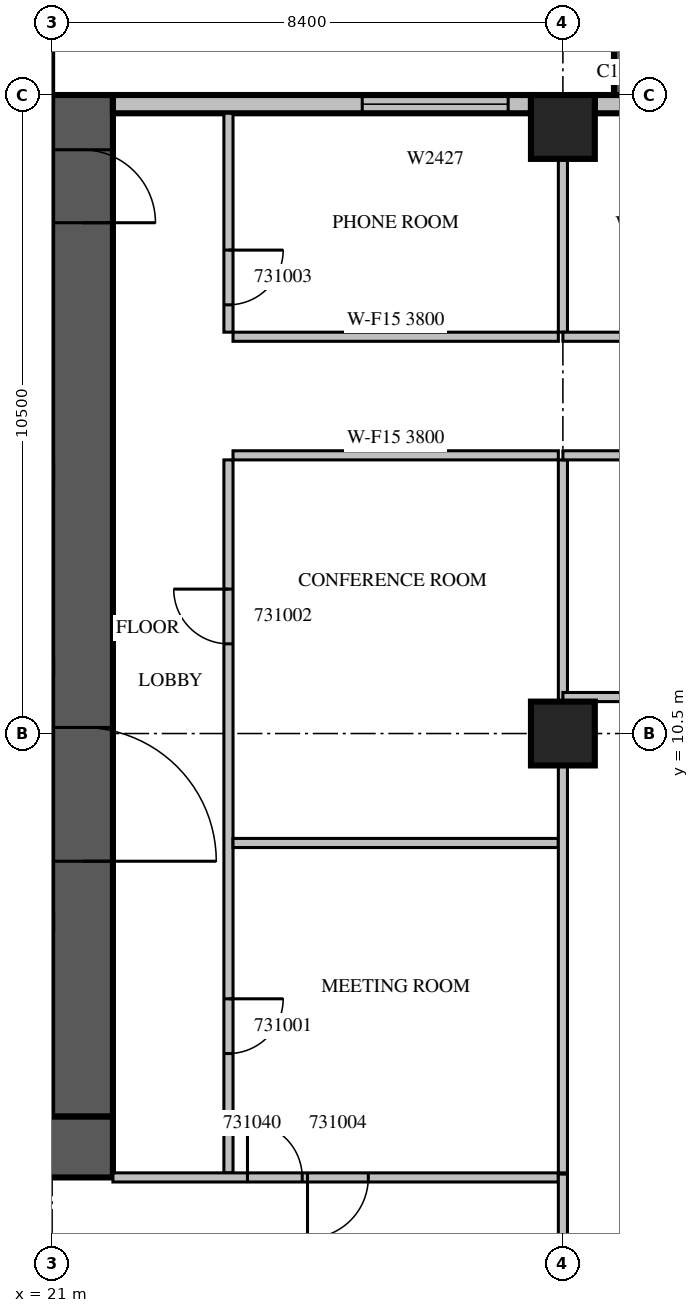
"""IFC4 building model, lengths in metres.
Left out: names, types, materials, properties, quantities, classifications, styles, units other than length and angle.
Written with IfcOpenShell. Run it as: python <this file> out.ifc"""

import sys

from ifc_helpers import new_model, si_unit, direction, frame, frame_2d, origin, origin_2d, place, context, subcontext, project, spatial, rectangle, extrude, source, transform, mapped, element, fill, save


model = new_model("IFC4")
c1 = context("Model", 3, precision=1e-05, world=origin(), true_north=direction((0.0, 1.0)))
c2 = subcontext(c1, "Body", "Model", "MODEL_VIEW")
j1 = project(units=[si_unit("LENGTHUNIT", "METRE"), si_unit("PLANEANGLEUNIT", "RADIAN")], contexts=[c1])
p1 = place(None, origin())
s1 = spatial("IfcSite", under=j1, at=p1, CompositionType="ELEMENT")
p2 = place(p1, origin())
s2 = spatial("IfcBuilding", under=s1, at=p2, CompositionType="ELEMENT")
p3 = place(p2, frame((0.0, 0.0, 141.3)))
s3 = spatial("IfcBuildingStorey", under=s2, at=p3, CompositionType="ELEMENT", Elevation=141.3)
m1 = source(origin(), c2, "Body", "SweptSolid", [
    extrude(rectangle(XDim=1.05, YDim=1.05, at=origin_2d()), origin(), (0.0, 0.0, 1.0), 4.2),
])
for number, where, z_axis, x_axis in (
    (1, (29.4, 10.5, 0.0), (0.0, 0.0, 1.0), (1.0, 0.0, 0.0)),
    (2, (29.4, 20.475, 0.0), (0.0, 0.0, 1.0), (1.0, 0.0, 0.0)),
):
    element("IfcColumn", number, at=place(p3, frame(where, z_axis=z_axis, x_axis=x_axis)), inside=s3, PredefinedType="COLUMN", context=c2, shape_type="MappedRepresentation", body=[
        mapped(m1, transform((0.0, 0.0, 0.0), scale=1.0)),
    ])
m2 = source(origin(), c2, "Body", "SweptSolid", [
    extrude(rectangle(XDim=16.8, YDim=1.0, at=frame_2d((8.4, 0.0))), origin(), (0.0, 0.0, 1.0), 4.2),
])
p4 = place(p3, frame((21.5, 4.2, 0.0), z_axis=(0.0, 0.0, 1.0), x_axis=(0.0, 1.0, 0.0)))
e3 = element("IfcWall", 3, at=p4, inside=s3, PredefinedType="SHEAR", context=c2, shape_type="MappedRepresentation", body=[
    mapped(m2, transform((0.0, 0.0, 0.0), scale=1.0)),
])
m3 = source(origin(), c2, "Body", "SweptSolid", [
    extrude(rectangle(XDim=2.2, YDim=2.1, at=frame_2d((1.1, 1.05))), frame((0.0, 0.51, 0.0), z_axis=(0.0, -1.0, 0.0), x_axis=(1.0, 0.0, 0.0)), (0.0, 0.0, 1.0), 1.02),
])
p5 = place(p4, frame((4.2, 0.0, 0.0)))
e4 = element("IfcOpeningElement", 4, at=p5, cuts=e3, PredefinedType="OPENING", context=c2, shape_type="MappedRepresentation", body=[
    mapped(m3, transform((0.0, 0.0, 0.0), scale=1.0)),
])
m4 = source(origin(), c2, "Body", "SweptSolid", [
    extrude(rectangle(XDim=1.2, YDim=2.1, at=frame_2d((0.6, 1.05))), frame((0.0, 0.51, 0.0), z_axis=(0.0, -1.0, 0.0), x_axis=(1.0, 0.0, 0.0)), (0.0, 0.0, 1.0), 1.02),
])
p6 = place(p4, frame((14.7, 0.0, 0.0)))
e5 = element("IfcOpeningElement", 5, at=p6, cuts=e3, PredefinedType="OPENING", context=c2, shape_type="MappedRepresentation", body=[
    mapped(m4, transform((0.0, 0.0, 0.0), scale=1.0)),
])
m5 = source(origin(), c2, "Body", "SweptSolid", [
    extrude(rectangle(XDim=17.8, YDim=1.0, at=frame_2d((8.9, 0.0))), origin(), (0.0, 0.0, 1.0), 4.2),
])
p7 = place(p3, frame((4.2, 3.7, 0.0), z_axis=(0.0, 0.0, 1.0), x_axis=(1.0, 0.0, 0.0)))
e6 = element("IfcWall", 6, at=p7, inside=s3, PredefinedType="SHEAR", context=c2, shape_type="MappedRepresentation", body=[
    mapped(m5, transform((0.0, 0.0, 0.0), scale=1.0)),
])
m6 = source(origin(), c2, "Body", "SweptSolid", [
    extrude(rectangle(XDim=3.9, YDim=0.2, at=frame_2d((1.95, 0.0))), origin(), (0.0, 0.0, 1.0), 3.8),
])
p8 = place(p3, frame((30.34, 21.0, 0.0), z_axis=(0.0, 0.0, 1.0), x_axis=(0.0, 1.0, 0.0)))
e7 = element("IfcWall", 7, at=p8, inside=s3, PredefinedType="SOLIDWALL", context=c2, shape_type="MappedRepresentation", body=[
    mapped(m6, transform((0.0, 0.0, 0.0), scale=1.0)),
])
m7 = source(origin(), c2, "Body", "SweptSolid", [
    extrude(rectangle(XDim=2.4, YDim=2.7, at=frame_2d((1.2, 1.35))), frame((0.0, 0.11, 0.0), z_axis=(0.0, -1.0, 0.0), x_axis=(1.0, 0.0, 0.0)), (0.0, 0.0, 1.0), 0.22),
])
p9 = place(p8, frame((0.75, 0.0, 0.6)))
e8 = element("IfcOpeningElement", 8, at=p9, cuts=e7, PredefinedType="OPENING", context=c2, shape_type="MappedRepresentation", body=[
    mapped(m7, transform((0.0, 0.0, 0.0), scale=1.0)),
])
m8 = source(origin(), c2, "Body", "SweptSolid", [
    extrude(rectangle(XDim=7.35, YDim=0.3, at=frame_2d((3.675, 0.0))), origin(), (0.0, 0.0, 1.0), 3.8),
])
p10 = place(p3, frame((37.275, 20.85, 0.0), z_axis=(0.0, 0.0, 1.0), x_axis=(-1.0, 0.0, 0.0)))
e9 = element("IfcWall", 9, at=p10, inside=s3, PredefinedType="STANDARD", context=c2, shape_type="MappedRepresentation", body=[
    mapped(m8, transform((0.0, 0.0, 0.0), scale=1.0)),
])
m9 = source(origin(), c2, "Body", "SweptSolid", [
    extrude(rectangle(XDim=1.0, YDim=2.1, at=frame_2d((0.5, 1.05))), frame((0.0, 0.16, 0.0), z_axis=(0.0, -1.0, 0.0), x_axis=(1.0, 0.0, 0.0)), (0.0, 0.0, 1.0), 0.32),
])
p11 = place(p10, frame((5.135, 0.0, 0.0)))
e10 = element("IfcOpeningElement", 10, at=p11, cuts=e9, PredefinedType="OPENING", context=c2, shape_type="MappedRepresentation", body=[
    mapped(m9, transform((0.0, 0.0, 0.0), scale=1.0)),
])
m10 = source(origin(), c2, "Body", "SweptSolid", [
    extrude(rectangle(XDim=6.875, YDim=0.3, at=frame_2d((3.438, 0.0))), origin(), (0.0, 0.0, 1.0), 3.8),
])
p12 = place(p3, frame((28.875, 20.85, 0.0), z_axis=(0.0, 0.0, 1.0), x_axis=(-1.0, 0.0, 0.0)))
e11 = element("IfcWall", 11, at=p12, inside=s3, PredefinedType="STANDARD", context=c2, shape_type="MappedRepresentation", body=[
    mapped(m10, transform((0.0, 0.0, 0.0), scale=1.0)),
])
m11 = source(origin(), c2, "Body", "SweptSolid", [
    extrude(rectangle(XDim=2.4, YDim=2.7, at=frame_2d((1.2, 1.35))), frame((0.0, 0.16, 0.0), z_axis=(0.0, -1.0, 0.0), x_axis=(1.0, 0.0, 0.0)), (0.0, 0.0, 1.0), 0.32),
])
p13 = place(p12, frame((0.375, 0.0, 0.6)))
e12 = element("IfcOpeningElement", 12, at=p13, cuts=e11, PredefinedType="OPENING", context=c2, shape_type="MappedRepresentation", body=[
    mapped(m11, transform((0.0, 0.0, 0.0), scale=1.0)),
])
m12 = source(origin(), c2, "Body", "SweptSolid", [
    extrude(rectangle(XDim=11.725, YDim=0.15, at=frame_2d((5.862, 0.0))), origin(), (0.0, 0.0, 1.0), 3.8),
])
p14 = place(p3, frame((23.9, 15.0, 0.0), z_axis=(0.0, 0.0, 1.0), x_axis=(0.0, -1.0, 0.0)))
e13 = element("IfcWall", 13, at=p14, inside=s3, PredefinedType="PARTITIONING", context=c2, shape_type="MappedRepresentation", body=[
    mapped(m12, transform((0.0, 0.0, 0.0), scale=1.0)),
])
m13 = source(origin(), c2, "Body", "SweptSolid", [
    extrude(rectangle(XDim=0.9, YDim=2.1, at=frame_2d((0.45, 1.05))), frame((0.0, 0.085, 0.0), z_axis=(0.0, -1.0, 0.0), x_axis=(1.0, 0.0, 0.0)), (0.0, 0.0, 1.0), 0.17),
])
p15 = place(p14, frame((8.863, 0.0, 0.0)))
e14 = element("IfcOpeningElement", 14, at=p15, cuts=e13, PredefinedType="OPENING", context=c2, shape_type="MappedRepresentation", body=[
    mapped(m13, transform((0.0, 0.0, 0.0), scale=1.0)),
])
p16 = place(p14, frame((2.125, 0.0, 0.0)))
e15 = element("IfcOpeningElement", 15, at=p16, cuts=e13, PredefinedType="OPENING", context=c2, shape_type="MappedRepresentation", body=[
    mapped(m13, transform((0.0, 0.0, 0.0), scale=1.0)),
])
m14 = source(origin(), c2, "Body", "SweptSolid", [
    extrude(rectangle(XDim=3.6, YDim=0.15, at=frame_2d((1.8, 0.0))), origin(), (0.0, 0.0, 1.0), 3.8),
])
p17 = place(p3, frame((23.9, 20.7, 0.0), z_axis=(0.0, 0.0, 1.0), x_axis=(0.0, -1.0, 0.0)))
e16 = element("IfcWall", 16, at=p17, inside=s3, PredefinedType="PARTITIONING", context=c2, shape_type="MappedRepresentation", body=[
    mapped(m14, transform((0.0, 0.0, 0.0), scale=1.0)),
])
p18 = place(p17, frame((2.25, 0.0, 0.0)))
e17 = element("IfcOpeningElement", 17, at=p18, cuts=e16, PredefinedType="OPENING", context=c2, shape_type="MappedRepresentation", body=[
    mapped(m13, transform((0.0, 0.0, 0.0), scale=1.0)),
])
p19 = place(p3, frame((29.325, 8.7, 0.0), z_axis=(0.0, 0.0, 1.0), x_axis=(-1.0, 0.0, 0.0)))
e18 = element("IfcWall", 18, at=p19, inside=s3, PredefinedType="PARTITIONING", context=c2, shape_type="SweptSolid", body=[
    extrude(rectangle(XDim=5.35, YDim=0.15, at=frame_2d((2.675, 0.0))), origin(), (0.0, 0.0, 1.0), 3.8),
])
m15 = source(origin(), c2, "Body", "SweptSolid", [
    extrude(rectangle(XDim=5.35, YDim=0.15, at=frame_2d((2.675, 0.0))), origin(), (0.0, 0.0, 1.0), 3.8),
])
for number, where, z_axis, x_axis in (
    (19, (29.325, 15.075, 0.0), (0.0, 0.0, 1.0), (-1.0, 0.0, 0.0)),
    (20, (23.975, 17.025, 0.0), (0.0, 0.0, 1.0), (1.0, 0.0, 0.0)),
):
    element("IfcWall", number, at=place(p3, frame(where, z_axis=z_axis, x_axis=x_axis)), inside=s3, PredefinedType="PARTITIONING", context=c2, shape_type="MappedRepresentation", body=[
        mapped(m15, transform((0.0, 0.0, 0.0), scale=1.0)),
    ])
m16 = source(origin(), c2, "Body", "SweptSolid", [
    extrude(rectangle(XDim=6.701, YDim=0.15, at=frame_2d((3.35, 0.0))), origin(), (0.0, 0.0, 1.0), 3.8),
])
p20 = place(p3, frame((29.4, 3.275, 0.0), z_axis=(0.0, 0.0, 1.0), x_axis=(0.0, 1.0, 0.0)))
e21 = element("IfcWall", 21, at=p20, inside=s3, PredefinedType="PARTITIONING", context=c2, shape_type="MappedRepresentation", body=[
    mapped(m16, transform((0.0, 0.0, 0.0), scale=1.0)),
])
m17 = source(origin(), c2, "Body", "SweptSolid", [
    extrude(rectangle(XDim=3.976, YDim=0.15, at=frame_2d((1.988, 0.0))), origin(), (0.0, 0.0, 1.0), 3.8),
])
p21 = place(p3, frame((29.4, 11.024, 0.0), z_axis=(0.0, 0.0, 1.0), x_axis=(0.0, 1.0, 0.0)))
e22 = element("IfcWall", 22, at=p21, inside=s3, PredefinedType="PARTITIONING", context=c2, shape_type="MappedRepresentation", body=[
    mapped(m17, transform((0.0, 0.0, 0.0), scale=1.0)),
])
m18 = source(origin(), c2, "Body", "SweptSolid", [
    extrude(rectangle(XDim=2.851, YDim=0.15, at=frame_2d((1.425, 0.0))), origin(), (0.0, 0.0, 1.0), 3.8),
])
p22 = place(p3, frame((29.4, 17.1, 0.0), z_axis=(0.0, 0.0, 1.0), x_axis=(0.0, 1.0, 0.0)))
e23 = element("IfcWall", 23, at=p22, inside=s3, PredefinedType="PARTITIONING", context=c2, shape_type="MappedRepresentation", body=[
    mapped(m18, transform((0.0, 0.0, 0.0), scale=1.0)),
])
m19 = source(origin(), c2, "Body", "SweptSolid", [
    extrude(rectangle(XDim=7.325, YDim=0.15, at=frame_2d((3.663, 0.0))), origin(), (0.0, 0.0, 1.0), 3.8),
])
p23 = place(p3, frame((22.0, 3.2, 0.0), z_axis=(0.0, 0.0, 1.0), x_axis=(1.0, 0.0, 0.0)))
e24 = element("IfcWall", 24, at=p23, inside=s3, PredefinedType="PARTITIONING", context=c2, shape_type="MappedRepresentation", body=[
    mapped(m19, transform((0.0, 0.0, 0.0), scale=1.0)),
])
m20 = source(origin(), c2, "Body", "SweptSolid", [
    extrude(rectangle(XDim=1.0, YDim=2.1, at=frame_2d((0.5, 1.05))), frame((0.0, 0.085, 0.0), z_axis=(0.0, -1.0, 0.0), x_axis=(1.0, 0.0, 0.0)), (0.0, 0.0, 1.0), 0.17),
])
p24 = place(p23, frame((3.2, 0.0, 0.0)))
e25 = element("IfcOpeningElement", 25, at=p24, cuts=e24, PredefinedType="OPENING", context=c2, shape_type="MappedRepresentation", body=[
    mapped(m20, transform((0.0, 0.0, 0.0), scale=1.0)),
])
p25 = place(p23, frame((2.213, 0.0, 0.0)))
e26 = element("IfcOpeningElement", 26, at=p25, cuts=e24, PredefinedType="OPENING", context=c2, shape_type="MappedRepresentation", body=[
    mapped(m13, transform((0.0, 0.0, 0.0), scale=1.0)),
])
m21 = source(origin(), c2, "Body", "SweptSolid", [
    extrude(rectangle(XDim=2.206, YDim=0.15, at=frame_2d((1.103, 0.0))), origin(), (0.0, 0.0, 1.0), 3.8),
])
p26 = place(p3, frame((29.4, 1.049, 0.0), z_axis=(0.0, 0.0, 1.0), x_axis=(0.0, 1.0, 0.0)))
e27 = element("IfcWall", 27, at=p26, inside=s3, PredefinedType="PARTITIONING", context=c2, shape_type="MappedRepresentation", body=[
    mapped(m21, transform((0.0, 0.0, 0.0), scale=1.0)),
])
m22 = source(origin(), c2, "Body", "SweptSolid", [
    extrude(rectangle(XDim=8.4, YDim=0.15, at=frame_2d((4.2, 0.0))), origin(), (0.0, 0.0, 1.0), 3.8),
])
p27 = place(p3, frame((37.8, 11.1, 0.0), z_axis=(0.0, 0.0, 1.0), x_axis=(-1.0, 0.0, 0.0)))
e28 = element("IfcWall", 28, at=p27, inside=s3, PredefinedType="PARTITIONING", context=c2, shape_type="MappedRepresentation", body=[
    mapped(m22, transform((0.0, 0.0, 0.0), scale=1.0)),
])
p28 = place(p27, frame((5.575, 0.0, 0.0)))
e29 = element("IfcOpeningElement", 29, at=p28, cuts=e28, PredefinedType="OPENING", context=c2, shape_type="MappedRepresentation", body=[
    mapped(m13, transform((0.0, 0.0, 0.0), scale=1.0)),
])
p29 = place(p27, frame((1.875, 0.0, 0.0)))
e30 = element("IfcOpeningElement", 30, at=p29, cuts=e28, PredefinedType="OPENING", context=c2, shape_type="MappedRepresentation", body=[
    mapped(m13, transform((0.0, 0.0, 0.0), scale=1.0)),
])
p30 = place(p3, frame((37.8, 15.075, 0.0), z_axis=(0.0, 0.0, 1.0), x_axis=(-1.0, 0.0, 0.0)))
e31 = element("IfcWall", 31, at=p30, inside=s3, PredefinedType="PARTITIONING", context=c2, shape_type="MappedRepresentation", body=[
    mapped(m22, transform((0.0, 0.0, 0.0), scale=1.0)),
])
m23 = source(origin(), c2, "Body", "SweptSolid", [
    extrude(rectangle(XDim=1.2, YDim=2.1, at=frame_2d((0.6, 1.05))), frame((0.0, 0.085, 0.0), z_axis=(0.0, -1.0, 0.0), x_axis=(1.0, 0.0, 0.0)), (0.0, 0.0, 1.0), 0.17),
])
p31 = place(p30, frame((3.6, 0.0, 0.0)))
e32 = element("IfcOpeningElement", 32, at=p31, cuts=e31, PredefinedType="OPENING", context=c2, shape_type="MappedRepresentation", body=[
    mapped(m23, transform((0.0, 0.0, 0.0), scale=1.0)),
])
m24 = source(origin(), c2, "Body", "SweptSolid", [
    extrude(rectangle(XDim=37.5, YDim=0.15, at=frame_2d((18.75, 0.0))), origin(), (0.0, 0.0, 1.0), 3.8),
])
p32 = place(p3, frame((29.4, 17.025, 0.0), z_axis=(0.0, 0.0, 1.0), x_axis=(1.0, 0.0, 0.0)))
e33 = element("IfcWall", 33, at=p32, inside=s3, PredefinedType="PARTITIONING", context=c2, shape_type="MappedRepresentation", body=[
    mapped(m24, transform((0.0, 0.0, 0.0), scale=1.0)),
])
p33 = place(p32, frame((1.357, 0.0, 0.0)))
e34 = element("IfcOpeningElement", 34, at=p33, cuts=e33, PredefinedType="OPENING", context=c2, shape_type="MappedRepresentation", body=[
    mapped(m20, transform((0.0, 0.0, 0.0), scale=1.0)),
])
p34 = place(p32, frame((4.669, 0.0, 0.0)))
e35 = element("IfcOpeningElement", 35, at=p34, cuts=e33, PredefinedType="OPENING", context=c2, shape_type="MappedRepresentation", body=[
    mapped(m20, transform((0.0, 0.0, 0.0), scale=1.0)),
])
p35 = place(p32, frame((7.012, 0.0, 0.0)))
e36 = element("IfcOpeningElement", 36, at=p35, cuts=e33, PredefinedType="OPENING", context=c2, shape_type="MappedRepresentation", body=[
    mapped(m20, transform((0.0, 0.0, 0.0), scale=1.0)),
])
p36 = place(p32, frame((12.0, 0.0, 0.0)))
e37 = element("IfcOpeningElement", 37, at=p36, cuts=e33, PredefinedType="OPENING", context=c2, shape_type="MappedRepresentation", body=[
    mapped(m23, transform((0.0, 0.0, 0.0), scale=1.0)),
])
p37 = place(p32, frame((19.29, 0.0, 0.0)))
e38 = element("IfcOpeningElement", 38, at=p37, cuts=e33, PredefinedType="OPENING", context=c2, shape_type="MappedRepresentation", body=[
    mapped(m13, transform((0.0, 0.0, 0.0), scale=1.0)),
])
p38 = place(p32, frame((25.17, 0.0, 0.0)))
e39 = element("IfcOpeningElement", 39, at=p38, cuts=e33, PredefinedType="OPENING", context=c2, shape_type="MappedRepresentation", body=[
    mapped(m13, transform((0.0, 0.0, 0.0), scale=1.0)),
])
p39 = place(p32, frame((30.214, 0.0, 0.0)))
e40 = element("IfcOpeningElement", 40, at=p39, cuts=e33, PredefinedType="OPENING", context=c2, shape_type="MappedRepresentation", body=[
    mapped(m23, transform((0.0, 0.0, 0.0), scale=1.0)),
])
p40 = place(p32, frame((34.721, 0.0, 0.0)))
e41 = element("IfcOpeningElement", 41, at=p40, cuts=e33, PredefinedType="OPENING", context=c2, shape_type="MappedRepresentation", body=[
    mapped(m23, transform((0.0, 0.0, 0.0), scale=1.0)),
])
m25 = source(origin(), c2, "Body", "SweptSolid", [
    extrude(rectangle(XDim=2.4, YDim=2.7, at=frame_2d((1.2, 1.35))), frame((0.0, 0.03, 0.0), z_axis=(0.0, -1.0, 0.0), x_axis=(1.0, 0.0, 0.0)), (0.0, 0.0, 1.0), 0.06),
])
p41 = place(p13, origin())
e42 = element("IfcWindow", 42, at=p41, inside=s3, PartitioningType="SINGLE_PANEL", PredefinedType="WINDOW", context=c2, shape_type="MappedRepresentation", body=[
    mapped(m25, transform((0.0, 0.0, 0.0), scale=1.0)),
])
fill(e12, e42)
m26 = source(origin(), c2, "Body", "SweptSolid", [
    extrude(rectangle(XDim=2.2, YDim=2.1, at=frame_2d((1.1, 1.05))), frame((0.0, 0.025, 0.0), z_axis=(0.0, -1.0, 0.0), x_axis=(1.0, 0.0, 0.0)), (0.0, 0.0, 1.0), 0.05),
])
p42 = place(p5, origin())
e43 = element("IfcDoor", 43, at=p42, inside=s3, OperationType="DOUBLE_DOOR_SINGLE_SWING", PredefinedType="DOOR", context=c2, shape_type="MappedRepresentation", body=[
    mapped(m26, transform((0.0, 0.0, 0.0), scale=1.0)),
])
fill(e4, e43)
m27 = source(origin(), c2, "Body", "SweptSolid", [
    extrude(rectangle(XDim=1.2, YDim=2.1, at=frame_2d((0.6, 1.05))), frame((0.0, 0.025, 0.0), z_axis=(0.0, -1.0, 0.0), x_axis=(1.0, 0.0, 0.0)), (0.0, 0.0, 1.0), 0.05),
])
p43 = place(p6, origin())
e44 = element("IfcDoor", 44, at=p43, inside=s3, OperationType="SINGLE_SWING_RIGHT", PredefinedType="DOOR", context=c2, shape_type="MappedRepresentation", body=[
    mapped(m27, transform((0.0, 0.0, 0.0), scale=1.0)),
])
fill(e5, e44)
m28 = source(origin(), c2, "Body", "SweptSolid", [
    extrude(rectangle(XDim=0.9, YDim=2.1, at=frame_2d((0.45, 1.05))), frame((0.0, 0.025, 0.0), z_axis=(0.0, -1.0, 0.0), x_axis=(1.0, 0.0, 0.0)), (0.0, 0.0, 1.0), 0.05),
])
p44 = place(p15, origin())
e45 = element("IfcDoor", 45, at=p44, inside=s3, OperationType="SINGLE_SWING_LEFT", PredefinedType="DOOR", context=c2, shape_type="MappedRepresentation", body=[
    mapped(m28, transform((0.0, 0.0, 0.0), scale=1.0)),
])
fill(e14, e45)
p45 = place(p16, origin())
e46 = element("IfcDoor", 46, at=p45, inside=s3, OperationType="SINGLE_SWING_RIGHT", PredefinedType="DOOR", context=c2, shape_type="MappedRepresentation", body=[
    mapped(m28, transform((0.0, 0.0, 0.0), scale=1.0)),
])
fill(e15, e46)
p46 = place(p18, origin())
e47 = element("IfcDoor", 47, at=p46, inside=s3, OperationType="SINGLE_SWING_LEFT", PredefinedType="DOOR", context=c2, shape_type="MappedRepresentation", body=[
    mapped(m28, transform((0.0, 0.0, 0.0), scale=1.0)),
])
fill(e17, e47)
m29 = source(origin(), c2, "Body", "SweptSolid", [
    extrude(rectangle(XDim=1.0, YDim=2.1, at=frame_2d((0.5, 1.05))), frame((0.0, 0.025, 0.0), z_axis=(0.0, -1.0, 0.0), x_axis=(1.0, 0.0, 0.0)), (0.0, 0.0, 1.0), 0.05),
])
p47 = place(p24, origin())
e48 = element("IfcDoor", 48, at=p47, inside=s3, OperationType="SINGLE_SWING_RIGHT", PredefinedType="DOOR", context=c2, shape_type="MappedRepresentation", body=[
    mapped(m29, transform((0.0, 0.0, 0.0), scale=1.0)),
])
fill(e25, e48)
p48 = place(p25, origin())
e49 = element("IfcDoor", 49, at=p48, inside=s3, OperationType="SINGLE_SWING_LEFT", PredefinedType="DOOR", context=c2, shape_type="MappedRepresentation", body=[
    mapped(m28, transform((0.0, 0.0, 0.0), scale=1.0)),
])
fill(e26, e49)
save(model, sys.argv[1])
